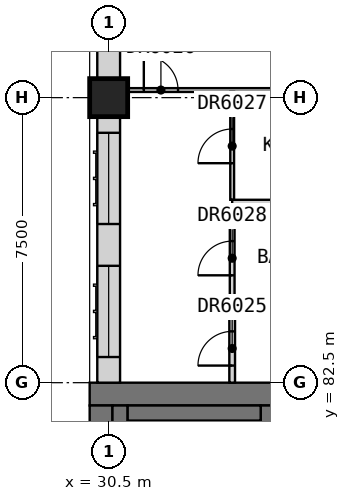
"""IFC4 building model, lengths in metres.
Left out: names, types, materials, properties, quantities, classifications, styles, units other than length and angle.
Written with IfcOpenShell. Run it as: python <this file> out.ifc"""

import sys

from ifc_helpers import new_model, si_unit, direction, frame, frame_2d, origin, origin_2d, place, context, subcontext, project, spatial, rectangle, extrude, element, fill, save


model = new_model("IFC4")
c1 = context("Model", 3, precision=1e-05, world=origin(), true_north=direction((0.0, 1.0)))
c2 = subcontext(c1, "Body", "Model", "MODEL_VIEW")
j1 = project(units=[si_unit("LENGTHUNIT", "METRE"), si_unit("PLANEANGLEUNIT", "RADIAN")], contexts=[c1])
p1 = place(None, origin())
s1 = spatial("IfcSite", under=j1, at=p1, CompositionType="ELEMENT")
p2 = place(p1, origin())
s2 = spatial("IfcBuilding", under=s1, at=p2, CompositionType="ELEMENT")
p3 = place(p2, frame((0.0, 0.0, 226.7)))
s3 = spatial("IfcBuildingStorey", under=s2, at=p3, CompositionType="ELEMENT", Elevation=226.7)
p4 = place(p3, frame((30.5, 90.0, 0.0), z_axis=(0.0, 0.0, 1.0), x_axis=(1.0, 0.0, 0.0)))
e1 = element("IfcColumn", 1, at=p4, inside=s3, PredefinedType="COLUMN", context=c2, shape_type="SweptSolid", body=[
    extrude(rectangle(XDim=1.0, YDim=1.0, at=origin_2d()), origin(), (0.0, 0.0, 1.0), 3.5),
])
p5 = place(p3, frame((30.0, 82.2, 0.0), z_axis=(0.0, 0.0, 1.0), x_axis=(1.0, 0.0, 0.0)))
e2 = element("IfcWall", 2, at=p5, inside=s3, PredefinedType="SHEAR", context=c2, shape_type="SweptSolid", body=[
    extrude(rectangle(XDim=30.0, YDim=0.6, at=frame_2d((15.0, 0.0))), origin(), (0.0, 0.0, 1.0), 3.5),
])
p6 = place(p3, frame((30.3, 60.6, 0.0), z_axis=(0.0, 0.0, 1.0), x_axis=(0.0, 1.0, 0.0)))
e3 = element("IfcWall", 3, at=p6, inside=s3, PredefinedType="SHEAR", context=c2, shape_type="SweptSolid", body=[
    extrude(rectangle(XDim=21.3, YDim=0.6, at=frame_2d((10.65, 0.0))), origin(), (0.0, 0.0, 1.0), 3.5),
])
p7 = place(p3, frame((34.75, 78.3, 0.0), z_axis=(0.0, 0.0, 1.0), x_axis=(0.0, 1.0, 0.0)))
e4 = element("IfcWall", 4, at=p7, inside=s3, PredefinedType="SHEAR", context=c2, shape_type="SweptSolid", body=[
    extrude(rectangle(XDim=3.6, YDim=0.5, at=frame_2d((1.8, 0.0))), origin(), (0.0, 0.0, 1.0), 3.5),
])
p8 = place(p3, frame((30.5, 92.5, 0.0), z_axis=(0.0, 0.0, 1.0), x_axis=(0.0, -1.0, 0.0)))
e5 = element("IfcWall", 5, at=p8, inside=s3, PredefinedType="SOLIDWALL", context=c2, shape_type="SweptSolid", body=[
    extrude(rectangle(XDim=2.0, YDim=0.6, at=frame_2d((1.0, 0.0))), origin(), (0.0, 0.0, 1.0), 3.25),
])
p9 = place(p3, frame((30.5, 89.5, 0.0), z_axis=(0.0, 0.0, 1.0), x_axis=(0.0, -1.0, 0.0)))
e6 = element("IfcWall", 6, at=p9, inside=s3, PredefinedType="SOLIDWALL", context=c2, shape_type="SweptSolid", body=[
    extrude(rectangle(XDim=7.0, YDim=0.6, at=frame_2d((3.5, 0.0))), origin(), (0.0, 0.0, 1.0), 3.25),
])
p10 = place(p9, frame((3.925, 0.0, 0.8)))
e7 = element("IfcOpeningElement", 7, at=p10, cuts=e6, PredefinedType="OPENING", context=c2, shape_type="SweptSolid", body=[
    extrude(rectangle(XDim=2.4, YDim=1.8, at=frame_2d((1.2, 0.9))), frame((0.0, 0.31, 0.0), z_axis=(0.0, -1.0, 0.0), x_axis=(1.0, 0.0, 0.0)), (0.0, 0.0, 1.0), 0.62),
])
p11 = place(p9, frame((0.425, 0.0, 0.8)))
e8 = element("IfcOpeningElement", 8, at=p11, cuts=e6, PredefinedType="OPENING", context=c2, shape_type="SweptSolid", body=[
    extrude(rectangle(XDim=2.4, YDim=1.8, at=frame_2d((1.2, 0.9))), frame((0.0, 0.31, 0.0), z_axis=(0.0, -1.0, 0.0), x_axis=(1.0, 0.0, 0.0)), (0.0, 0.0, 1.0), 0.62),
])
p12 = place(p3, frame((30.8, 60.6, 0.0), z_axis=(0.0, 0.0, 1.0), x_axis=(0.0, 1.0, 0.0)))
e9 = element("IfcWall", 9, at=p12, inside=s3, PredefinedType="SOLIDWALL", context=c2, shape_type="SweptSolid", body=[
    extrude(rectangle(XDim=21.3, YDim=0.4, at=frame_2d((10.65, 0.0))), origin(), (0.0, 0.0, 1.0), 3.25),
])
p13 = place(p3, frame((31.0, 81.7, 0.0), z_axis=(0.0, 0.0, 1.0), x_axis=(1.0, 0.0, 0.0)))
e10 = element("IfcWall", 10, at=p13, inside=s3, PredefinedType="SOLIDWALL", context=c2, shape_type="SweptSolid", body=[
    extrude(rectangle(XDim=3.5, YDim=0.4, at=frame_2d((1.75, 0.0))), origin(), (0.0, 0.0, 1.0), 3.25),
])
p14 = place(p3, frame((33.75, 84.3, 0.0), z_axis=(0.0, 0.0, 1.0), x_axis=(1.0, 0.0, 0.0)))
e11 = element("IfcWall", 11, at=p14, inside=s3, PredefinedType="PARTITIONING", context=c2, shape_type="SweptSolid", body=[
    extrude(rectangle(XDim=28.05, YDim=0.15, at=frame_2d((14.025, 0.0))), origin(), (0.0, 0.0, 1.0), 3.25),
])
p15 = place(p14, frame((12.675, 0.0, 0.0)))
e12 = element("IfcOpeningElement", 12, at=p15, cuts=e11, PredefinedType="OPENING", context=c2, shape_type="SweptSolid", body=[
    extrude(rectangle(XDim=0.9, YDim=2.1, at=frame_2d((0.45, 1.05))), frame((0.0, 0.085, 0.0), z_axis=(0.0, -1.0, 0.0), x_axis=(1.0, 0.0, 0.0)), (0.0, 0.0, 1.0), 0.17),
])
p16 = place(p14, frame((20.175, 0.0, 0.0)))
e13 = element("IfcOpeningElement", 13, at=p16, cuts=e11, PredefinedType="OPENING", context=c2, shape_type="SweptSolid", body=[
    extrude(rectangle(XDim=0.9, YDim=2.1, at=frame_2d((0.45, 1.05))), frame((0.0, 0.085, 0.0), z_axis=(0.0, -1.0, 0.0), x_axis=(1.0, 0.0, 0.0)), (0.0, 0.0, 1.0), 0.17),
])
p17 = place(p14, frame((26.65, 0.0, 0.0)))
e14 = element("IfcOpeningElement", 14, at=p17, cuts=e11, PredefinedType="OPENING", context=c2, shape_type="SweptSolid", body=[
    extrude(rectangle(XDim=1.0, YDim=2.1, at=frame_2d((0.5, 1.05))), frame((0.0, 0.085, 0.0), z_axis=(0.0, -1.0, 0.0), x_axis=(1.0, 0.0, 0.0)), (0.0, 0.0, 1.0), 0.17),
])
p18 = place(p3, frame((33.75, 82.5, 0.0), z_axis=(0.0, 0.0, 1.0), x_axis=(0.0, 1.0, 0.0)))
e15 = element("IfcWall", 15, at=p18, inside=s3, PredefinedType="PARTITIONING", context=c2, shape_type="SweptSolid", body=[
    extrude(rectangle(XDim=1.725, YDim=0.15, at=frame_2d((0.863, 0.0))), origin(), (0.0, 0.0, 1.0), 3.25),
])
p19 = place(p18, frame((0.45, 0.0, 0.0)))
e16 = element("IfcOpeningElement", 16, at=p19, cuts=e15, PredefinedType="OPENING", context=c2, shape_type="SweptSolid", body=[
    extrude(rectangle(XDim=0.9, YDim=2.1, at=frame_2d((0.45, 1.05))), frame((0.0, 0.085, 0.0), z_axis=(0.0, -1.0, 0.0), x_axis=(1.0, 0.0, 0.0)), (0.0, 0.0, 1.0), 0.17),
])
p20 = place(p3, frame((30.0, 90.2, 0.0), z_axis=(0.0, 0.0, 1.0), x_axis=(1.0, 0.0, 0.0)))
e17 = element("IfcWall", 17, at=p20, inside=s3, PredefinedType="PARTITIONING", context=c2, shape_type="SweptSolid", body=[
    extrude(rectangle(XDim=29.9, YDim=0.1, at=frame_2d((14.95, 0.0))), origin(), (0.0, 0.0, 1.0), 2.75),
])
p21 = place(p20, frame((1.425, 0.0, 0.0)))
e18 = element("IfcOpeningElement", 18, at=p21, cuts=e17, PredefinedType="OPENING", context=c2, shape_type="SweptSolid", body=[
    extrude(rectangle(XDim=0.9, YDim=2.1, at=frame_2d((0.45, 1.05))), frame((0.0, 0.06, 0.0), z_axis=(0.0, -1.0, 0.0), x_axis=(1.0, 0.0, 0.0)), (0.0, 0.0, 1.0), 0.12),
])
p22 = place(p20, frame((8.925, 0.0, 0.0)))
e19 = element("IfcOpeningElement", 19, at=p22, cuts=e17, PredefinedType="OPENING", context=c2, shape_type="SweptSolid", body=[
    extrude(rectangle(XDim=0.9, YDim=2.1, at=frame_2d((0.45, 1.05))), frame((0.0, 0.06, 0.0), z_axis=(0.0, -1.0, 0.0), x_axis=(1.0, 0.0, 0.0)), (0.0, 0.0, 1.0), 0.12),
])
p23 = place(p20, frame((12.675, 0.0, 0.0)))
e20 = element("IfcOpeningElement", 20, at=p23, cuts=e17, PredefinedType="OPENING", context=c2, shape_type="SweptSolid", body=[
    extrude(rectangle(XDim=0.9, YDim=2.1, at=frame_2d((0.45, 1.05))), frame((0.0, 0.06, 0.0), z_axis=(0.0, -1.0, 0.0), x_axis=(1.0, 0.0, 0.0)), (0.0, 0.0, 1.0), 0.12),
])
p24 = place(p20, frame((16.425, 0.0, 0.0)))
e21 = element("IfcOpeningElement", 21, at=p24, cuts=e17, PredefinedType="OPENING", context=c2, shape_type="SweptSolid", body=[
    extrude(rectangle(XDim=0.9, YDim=2.1, at=frame_2d((0.45, 1.05))), frame((0.0, 0.06, 0.0), z_axis=(0.0, -1.0, 0.0), x_axis=(1.0, 0.0, 0.0)), (0.0, 0.0, 1.0), 0.12),
])
p25 = place(p20, frame((23.925, 0.0, 0.0)))
e22 = element("IfcOpeningElement", 22, at=p25, cuts=e17, PredefinedType="OPENING", context=c2, shape_type="SweptSolid", body=[
    extrude(rectangle(XDim=0.9, YDim=2.1, at=frame_2d((0.45, 1.05))), frame((0.0, 0.06, 0.0), z_axis=(0.0, -1.0, 0.0), x_axis=(1.0, 0.0, 0.0)), (0.0, 0.0, 1.0), 0.12),
])
p26 = place(p3, frame((33.75, 87.312, 0.0), z_axis=(0.0, 0.0, 1.0), x_axis=(0.0, 1.0, 0.0)))
e23 = element("IfcWall", 23, at=p26, inside=s3, PredefinedType="PARTITIONING", context=c2, shape_type="SweptSolid", body=[
    extrude(rectangle(XDim=2.837, YDim=0.1, at=frame_2d((1.419, 0.0))), origin(), (0.0, 0.0, 1.0), 3.25),
])
p27 = place(p26, frame((0.962, 0.0, 0.0)))
e24 = element("IfcOpeningElement", 24, at=p27, cuts=e23, PredefinedType="OPENING", context=c2, shape_type="SweptSolid", body=[
    extrude(rectangle(XDim=0.9, YDim=2.1, at=frame_2d((0.45, 1.05))), frame((0.0, 0.06, 0.0), z_axis=(0.0, -1.0, 0.0), x_axis=(1.0, 0.0, 0.0)), (0.0, 0.0, 1.0), 0.12),
])
p28 = place(p3, frame((33.75, 87.25, 0.0), z_axis=(0.0, 0.0, 1.0), x_axis=(1.0, 0.0, 0.0)))
e25 = element("IfcWall", 25, at=p28, inside=s3, PredefinedType="PARTITIONING", context=c2, shape_type="SweptSolid", body=[
    extrude(rectangle(XDim=3.75, YDim=0.125, at=frame_2d((1.875, 0.0))), origin(), (0.0, 0.0, 1.0), 3.25),
])
p29 = place(p3, frame((33.75, 84.375, 0.0), z_axis=(0.0, 0.0, 1.0), x_axis=(0.0, 1.0, 0.0)))
e26 = element("IfcWall", 26, at=p29, inside=s3, PredefinedType="PARTITIONING", context=c2, shape_type="SweptSolid", body=[
    extrude(rectangle(XDim=2.812, YDim=0.125, at=frame_2d((1.406, 0.0))), origin(), (0.0, 0.0, 1.0), 3.25),
])
p30 = place(p29, frame((0.95, 0.0, 0.0)))
e27 = element("IfcOpeningElement", 27, at=p30, cuts=e26, PredefinedType="OPENING", context=c2, shape_type="SweptSolid", body=[
    extrude(rectangle(XDim=0.9, YDim=2.1, at=frame_2d((0.45, 1.05))), frame((0.0, 0.073, 0.0), z_axis=(0.0, -1.0, 0.0), x_axis=(1.0, 0.0, 0.0)), (0.0, 0.0, 1.0), 0.145),
])
p31 = place(p10, origin())
e28 = element("IfcWindow", 28, at=p31, inside=s3, PartitioningType="SINGLE_PANEL", PredefinedType="WINDOW", context=c2, shape_type="SweptSolid", body=[
    extrude(rectangle(XDim=2.4, YDim=1.8, at=frame_2d((1.2, 0.9))), frame((0.0, -0.07, 0.0), z_axis=(0.0, -1.0, 0.0), x_axis=(1.0, 0.0, 0.0)), (0.0, 0.0, 1.0), 0.06),
])
fill(e7, e28)
p32 = place(p11, origin())
e29 = element("IfcWindow", 29, at=p32, inside=s3, PartitioningType="SINGLE_PANEL", PredefinedType="WINDOW", context=c2, shape_type="SweptSolid", body=[
    extrude(rectangle(XDim=2.4, YDim=1.8, at=frame_2d((1.2, 0.9))), frame((0.0, -0.07, 0.0), z_axis=(0.0, -1.0, 0.0), x_axis=(1.0, 0.0, 0.0)), (0.0, 0.0, 1.0), 0.06),
])
fill(e8, e29)
p33 = place(p19, origin())
e30 = element("IfcDoor", 30, at=p33, inside=s3, OperationType="SINGLE_SWING_LEFT", PredefinedType="DOOR", context=c2, shape_type="SweptSolid", body=[
    extrude(rectangle(XDim=0.9, YDim=2.1, at=frame_2d((0.45, 1.05))), frame((0.0, 0.025, 0.0), z_axis=(0.0, -1.0, 0.0), x_axis=(1.0, 0.0, 0.0)), (0.0, 0.0, 1.0), 0.05),
])
fill(e16, e30)
p34 = place(p21, origin())
e31 = element("IfcDoor", 31, at=p34, inside=s3, OperationType="SINGLE_SWING_RIGHT", PredefinedType="DOOR", context=c2, shape_type="SweptSolid", body=[
    extrude(rectangle(XDim=0.9, YDim=2.1, at=frame_2d((0.45, 1.05))), frame((0.0, 0.025, 0.0), z_axis=(0.0, -1.0, 0.0), x_axis=(1.0, 0.0, 0.0)), (0.0, 0.0, 1.0), 0.05),
])
fill(e18, e31)
p35 = place(p27, origin())
e32 = element("IfcDoor", 32, at=p35, inside=s3, OperationType="SINGLE_SWING_RIGHT", PredefinedType="DOOR", context=c2, shape_type="SweptSolid", body=[
    extrude(rectangle(XDim=0.9, YDim=2.1, at=frame_2d((0.45, 1.05))), frame((0.0, 0.025, 0.0), z_axis=(0.0, -1.0, 0.0), x_axis=(1.0, 0.0, 0.0)), (0.0, 0.0, 1.0), 0.05),
])
fill(e24, e32)
p36 = place(p30, origin())
e33 = element("IfcDoor", 33, at=p36, inside=s3, OperationType="SINGLE_SWING_RIGHT", PredefinedType="DOOR", context=c2, shape_type="SweptSolid", body=[
    extrude(rectangle(XDim=0.9, YDim=2.1, at=frame_2d((0.45, 1.05))), frame((0.0, 0.025, 0.0), z_axis=(0.0, -1.0, 0.0), x_axis=(1.0, 0.0, 0.0)), (0.0, 0.0, 1.0), 0.05),
])
fill(e27, e33)
save(model, sys.argv[1])
